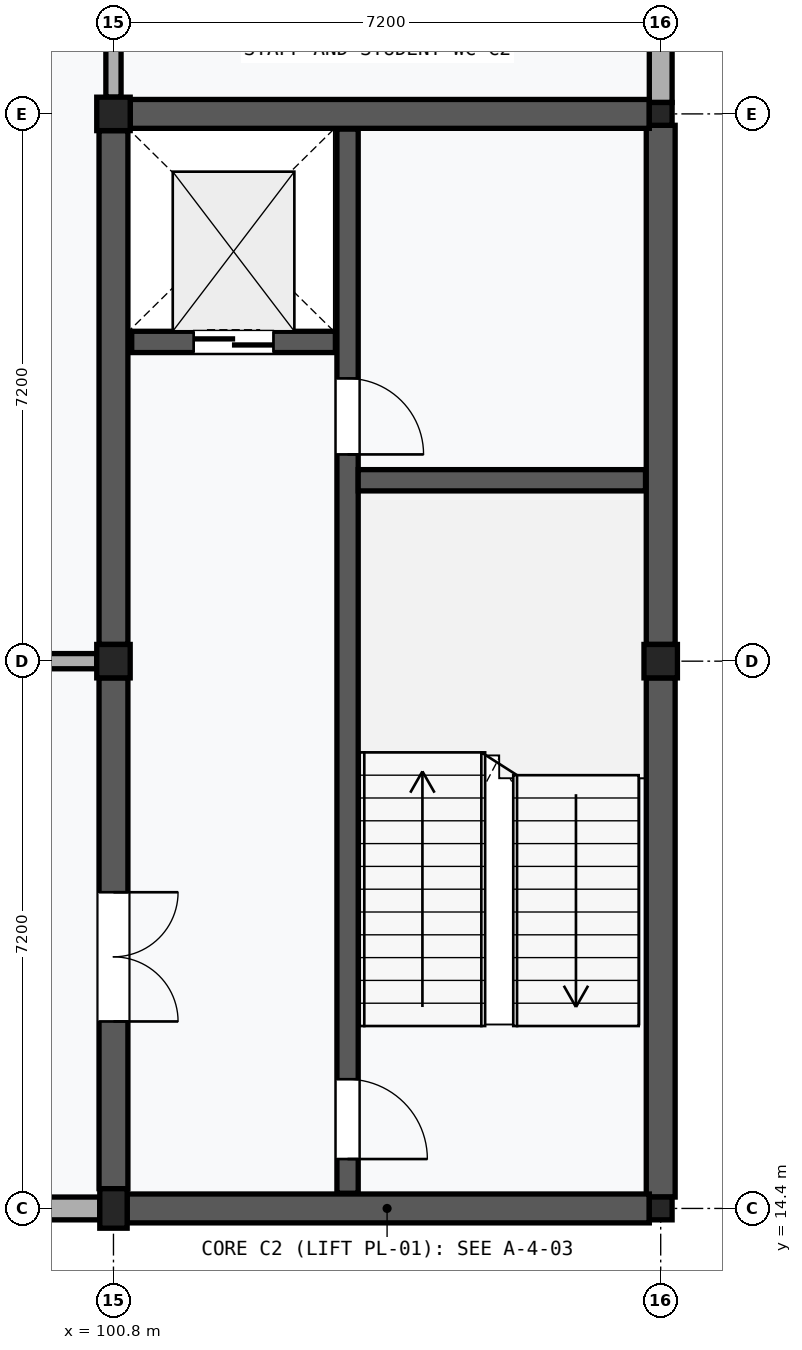
"""IFC4 building model, lengths in metres.
Left out: names, types, materials, properties, quantities, classifications, styles, units other than length and angle.
Written with IfcOpenShell. Run it as: python <this file> out.ifc"""

import sys

from ifc_helpers import new_model, si_unit, direction, frame, frame_2d, origin, origin_2d, place, context, subcontext, project, spatial, rectangle, extrude, element, fill, save


model = new_model("IFC4")
c1 = context("Model", 3, precision=1e-05, world=origin(), true_north=direction((0.0, 1.0)))
c2 = subcontext(c1, "Body", "Model", "MODEL_VIEW")
j1 = project(units=[si_unit("LENGTHUNIT", "METRE"), si_unit("PLANEANGLEUNIT", "RADIAN")], contexts=[c1])
p1 = place(None, origin())
s1 = spatial("IfcSite", under=j1, at=p1, CompositionType="ELEMENT")
p2 = place(p1, origin())
s2 = spatial("IfcBuilding", under=s1, at=p2, CompositionType="ELEMENT")
p3 = place(p2, frame((0.0, 0.0, 59.0)))
s3 = spatial("IfcBuildingStorey", under=s2, at=p3, CompositionType="ELEMENT", Elevation=59.0)
p4 = place(p3, frame((100.8, 14.4, 0.0), z_axis=(0.0, 0.0, 1.0), x_axis=(1.0, 0.0, 0.0)))
e1 = element("IfcColumn", 1, at=p4, inside=s3, PredefinedType="PILASTER", context=c2, shape_type="SweptSolid", body=[
    extrude(rectangle(XDim=0.36, YDim=0.52, at=origin_2d()), origin(), (0.0, 0.0, 1.0), 4.0),
])
for number, where, z_axis, x_axis in (
    (2, (100.8, 21.6, 0.0), (0.0, 0.0, 1.0), (1.0, 0.0, 0.0)),
    (3, (100.8, 28.8, 0.0), (0.0, 0.0, 1.0), (1.0, 0.0, 0.0)),
):
    element("IfcColumn", number, at=place(p3, frame(where, z_axis=z_axis, x_axis=x_axis)), inside=s3, PredefinedType="COLUMN", context=c2, shape_type="SweptSolid", body=[
        extrude(rectangle(XDim=0.44, YDim=0.44, at=origin_2d()), origin(), (0.0, 0.0, 1.0), 4.0),
    ])
p5 = place(p3, frame((108.0, 14.4, 0.0), z_axis=(0.0, 0.0, 1.0), x_axis=(1.0, 0.0, 0.0)))
e4 = element("IfcColumn", 4, at=p5, inside=s3, PredefinedType="COLUMN", context=c2, shape_type="SweptSolid", body=[
    extrude(rectangle(XDim=0.3, YDim=0.3, at=origin_2d()), origin(), (0.0, 0.0, 1.0), 4.0),
])
p6 = place(p3, frame((108.0, 21.6, 0.0), z_axis=(0.0, 0.0, 1.0), x_axis=(1.0, 0.0, 0.0)))
e5 = element("IfcColumn", 5, at=p6, inside=s3, PredefinedType="COLUMN", context=c2, shape_type="SweptSolid", body=[
    extrude(rectangle(XDim=0.44, YDim=0.44, at=origin_2d()), origin(), (0.0, 0.0, 1.0), 4.0),
])
p7 = place(p3, frame((108.0, 28.8, 0.0), z_axis=(0.0, 0.0, 1.0), x_axis=(1.0, 0.0, 0.0)))
e6 = element("IfcColumn", 6, at=p7, inside=s3, PredefinedType="COLUMN", context=c2, shape_type="SweptSolid", body=[
    extrude(rectangle(XDim=0.3, YDim=0.3, at=origin_2d()), origin(), (0.0, 0.0, 1.0), 4.0),
])
p8 = place(p3, frame((93.75, 14.4, 0.0), z_axis=(0.0, 0.0, 1.0), x_axis=(1.0, 0.0, 0.0)))
e7 = element("IfcWall", 7, at=p8, inside=s3, PredefinedType="SOLIDWALL", context=c2, shape_type="SweptSolid", body=[
    extrude(rectangle(XDim=6.87, YDim=0.3, at=frame_2d((3.435, 0.0))), origin(), (0.0, 0.0, 1.0), 3.19),
])
p9 = place(p8, frame((1.735, 0.0, 0.9)))
e8 = element("IfcOpeningElement", 8, at=p9, cuts=e7, PredefinedType="OPENING", context=c2, shape_type="SweptSolid", body=[
    extrude(rectangle(XDim=3.4, YDim=1.8, at=frame_2d((1.7, 0.9))), frame((0.0, 0.162, 0.0), z_axis=(0.0, -1.0, 0.0), x_axis=(1.0, 0.0, 0.0)), (0.0, 0.0, 1.0), 0.324),
])
p10 = place(p3, frame((108.0, 28.95, 0.0), z_axis=(0.0, 0.0, 1.0), x_axis=(0.0, 1.0, 0.0)))
e9 = element("IfcWall", 9, at=p10, inside=s3, PredefinedType="SOLIDWALL", context=c2, shape_type="SweptSolid", body=[
    extrude(rectangle(XDim=6.79, YDim=0.3, at=frame_2d((3.395, 0.0))), origin(), (0.0, 0.0, 1.0), 3.19),
])
p11 = place(p3, frame((100.8, 14.66, 0.0), z_axis=(0.0, 0.0, 1.0), x_axis=(0.0, 1.0, 0.0)))
e10 = element("IfcWall", 10, at=p11, inside=s3, PredefinedType="SHEAR", context=c2, shape_type="SweptSolid", body=[
    extrude(rectangle(XDim=6.72, YDim=0.38, at=frame_2d((3.36, 0.0))), origin(), (0.0, 0.0, 1.0), 3.11),
])
p12 = place(p11, frame((2.2, 0.0, 0.0)))
e11 = element("IfcOpeningElement", 11, at=p12, cuts=e10, PredefinedType="OPENING", context=c2, shape_type="SweptSolid", body=[
    extrude(rectangle(XDim=1.7, YDim=2.25, at=frame_2d((0.85, 1.125))), frame((0.0, 0.202, 0.0), z_axis=(0.0, -1.0, 0.0), x_axis=(1.0, 0.0, 0.0)), (0.0, 0.0, 1.0), 0.404),
])
p13 = place(p3, frame((100.8, 21.82, 0.0), z_axis=(0.0, 0.0, 1.0), x_axis=(0.0, 1.0, 0.0)))
e12 = element("IfcWall", 12, at=p13, inside=s3, PredefinedType="SHEAR", context=c2, shape_type="SweptSolid", body=[
    extrude(rectangle(XDim=6.76, YDim=0.38, at=frame_2d((3.38, 0.0))), origin(), (0.0, 0.0, 1.0), 3.11),
])
for number, where, z_axis, x_axis in (
    (13, (108.0, 14.55, 0.0), (0.0, 0.0, 1.0), (0.0, 1.0, 0.0)),
    (14, (108.0, 21.82, 0.0), (0.0, 0.0, 1.0), (0.0, 1.0, 0.0)),
):
    element("IfcWall", number, at=place(p3, frame(where, z_axis=z_axis, x_axis=x_axis)), inside=s3, PredefinedType="SHEAR", context=c2, shape_type="SweptSolid", body=[
        extrude(rectangle(XDim=6.83, YDim=0.38, at=frame_2d((3.415, 0.0))), origin(), (0.0, 0.0, 1.0), 3.19),
    ])
p14 = place(p3, frame((100.98, 14.4, 0.0), z_axis=(0.0, 0.0, 1.0), x_axis=(1.0, 0.0, 0.0)))
e15 = element("IfcWall", 15, at=p14, inside=s3, PredefinedType="SHEAR", context=c2, shape_type="SweptSolid", body=[
    extrude(rectangle(XDim=6.87, YDim=0.38, at=frame_2d((3.435, 0.0))), origin(), (0.0, 0.0, 1.0), 3.19),
])
p15 = place(p3, frame((101.02, 28.8, 0.0), z_axis=(0.0, 0.0, 1.0), x_axis=(1.0, 0.0, 0.0)))
e16 = element("IfcWall", 16, at=p15, inside=s3, PredefinedType="SHEAR", context=c2, shape_type="SweptSolid", body=[
    extrude(rectangle(XDim=6.83, YDim=0.38, at=frame_2d((3.415, 0.0))), origin(), (0.0, 0.0, 1.0), 3.11),
])
p16 = place(p3, frame((103.88, 14.6, 0.0), z_axis=(0.0, 0.0, 1.0), x_axis=(0.0, 1.0, 0.0)))
e17 = element("IfcWall", 17, at=p16, inside=s3, PredefinedType="SHEAR", context=c2, shape_type="SweptSolid", body=[
    extrude(rectangle(XDim=14.0, YDim=0.28, at=frame_2d((7.0, 0.0))), origin(), (0.0, 0.0, 1.0), 3.76),
])
p17 = place(p16, frame((0.45, 0.0, 0.0)))
e18 = element("IfcOpeningElement", 18, at=p17, cuts=e17, PredefinedType="OPENING", context=c2, shape_type="SweptSolid", body=[
    extrude(rectangle(XDim=1.05, YDim=2.15, at=frame_2d((0.525, 1.075))), frame((0.0, 0.152, 0.0), z_axis=(0.0, -1.0, 0.0), x_axis=(1.0, 0.0, 0.0)), (0.0, 0.0, 1.0), 0.304),
])
p18 = place(p16, frame((9.72, 0.0, 0.0)))
e19 = element("IfcOpeningElement", 19, at=p18, cuts=e17, PredefinedType="OPENING", context=c2, shape_type="SweptSolid", body=[
    extrude(rectangle(XDim=1.0, YDim=2.15, at=frame_2d((0.5, 1.075))), frame((0.0, 0.152, 0.0), z_axis=(0.0, -1.0, 0.0), x_axis=(1.0, 0.0, 0.0)), (0.0, 0.0, 1.0), 0.304),
])
p19 = place(p3, frame((104.02, 23.98, 0.0), z_axis=(0.0, 0.0, 1.0), x_axis=(1.0, 0.0, 0.0)))
e20 = element("IfcWall", 20, at=p19, inside=s3, PredefinedType="SHEAR", context=c2, shape_type="SweptSolid", body=[
    extrude(rectangle(XDim=3.78, YDim=0.28, at=frame_2d((1.89, 0.0))), origin(), (0.0, 0.0, 1.0), 3.76),
])
p20 = place(p3, frame((101.04, 25.8, 0.0), z_axis=(0.0, 0.0, 1.0), x_axis=(1.0, 0.0, 0.0)))
e21 = element("IfcWall", 21, at=p20, inside=s3, PredefinedType="SHEAR", context=c2, shape_type="SweptSolid", body=[
    extrude(rectangle(XDim=2.68, YDim=0.28, at=frame_2d((1.34, 0.0))), origin(), (0.0, 0.0, 1.0), 3.76),
])
p21 = place(p20, frame((0.815, 0.0, 0.0)))
e22 = element("IfcOpeningElement", 22, at=p21, cuts=e21, PredefinedType="OPENING", context=c2, shape_type="SweptSolid", body=[
    extrude(rectangle(XDim=1.05, YDim=2.2, at=frame_2d((0.525, 1.1))), frame((0.0, 0.152, 0.0), z_axis=(0.0, -1.0, 0.0), x_axis=(1.0, 0.0, 0.0)), (0.0, 0.0, 1.0), 0.304),
])
p22 = place(p3, frame((93.82, 21.6, 0.0), z_axis=(0.0, 0.0, 1.0), x_axis=(1.0, 0.0, 0.0)))
e23 = element("IfcWall", 23, at=p22, inside=s3, PredefinedType="PARTITIONING", context=c2, shape_type="SweptSolid", body=[
    extrude(rectangle(XDim=6.76, YDim=0.2, at=frame_2d((3.38, 0.0))), origin(), (0.0, 0.0, 1.0), 3.11),
])
p23 = place(p22, frame((2.76, 0.0, 0.0)))
e24 = element("IfcOpeningElement", 24, at=p23, cuts=e23, PredefinedType="OPENING", context=c2, shape_type="SweptSolid", body=[
    extrude(rectangle(XDim=1.24, YDim=2.26, at=frame_2d((0.62, 1.13))), frame((0.0, 0.112, 0.0), z_axis=(0.0, -1.0, 0.0), x_axis=(1.0, 0.0, 0.0)), (0.0, 0.0, 1.0), 0.224),
])
p24 = place(p3, frame((100.8, 29.02, 0.0), z_axis=(0.0, 0.0, 1.0), x_axis=(0.0, 1.0, 0.0)))
e25 = element("IfcWall", 25, at=p24, inside=s3, PredefinedType="PARTITIONING", context=c2, shape_type="SweptSolid", body=[
    extrude(rectangle(XDim=6.76, YDim=0.2, at=frame_2d((3.38, 0.0))), origin(), (0.0, 0.0, 1.0), 3.11),
])
p25 = place(p12, frame((1.7, 0.0, 0.0), z_axis=(0.0, 0.0, 1.0), x_axis=(-1.0, 0.0, 0.0)))
e26 = element("IfcDoor", 26, at=p25, inside=s3, OperationType="DOUBLE_DOOR_SINGLE_SWING", PredefinedType="DOOR", context=c2, shape_type="SweptSolid", body=[
    extrude(rectangle(XDim=1.7, YDim=2.25, at=frame_2d((0.85, 1.125))), frame((0.0, 0.025, 0.0), z_axis=(0.0, -1.0, 0.0), x_axis=(1.0, 0.0, 0.0)), (0.0, 0.0, 1.0), 0.05),
])
fill(e11, e26)
p26 = place(p17, frame((1.05, 0.0, 0.0), z_axis=(0.0, 0.0, 1.0), x_axis=(-1.0, 0.0, 0.0)))
e27 = element("IfcDoor", 27, at=p26, inside=s3, OperationType="SINGLE_SWING_RIGHT", PredefinedType="DOOR", context=c2, shape_type="SweptSolid", body=[
    extrude(rectangle(XDim=1.05, YDim=2.15, at=frame_2d((0.525, 1.075))), frame((0.0, 0.025, 0.0), z_axis=(0.0, -1.0, 0.0), x_axis=(1.0, 0.0, 0.0)), (0.0, 0.0, 1.0), 0.05),
])
fill(e18, e27)
p27 = place(p18, frame((1.0, 0.0, 0.0), z_axis=(0.0, 0.0, 1.0), x_axis=(-1.0, 0.0, 0.0)))
e28 = element("IfcDoor", 28, at=p27, inside=s3, OperationType="SINGLE_SWING_RIGHT", PredefinedType="DOOR", context=c2, shape_type="SweptSolid", body=[
    extrude(rectangle(XDim=1.0, YDim=2.15, at=frame_2d((0.5, 1.075))), frame((0.0, 0.025, 0.0), z_axis=(0.0, -1.0, 0.0), x_axis=(1.0, 0.0, 0.0)), (0.0, 0.0, 1.0), 0.05),
])
fill(e19, e28)
p28 = place(p21, frame((1.05, 0.0, 0.0), z_axis=(0.0, 0.0, 1.0), x_axis=(-1.0, 0.0, 0.0)))
e29 = element("IfcDoor", 29, at=p28, inside=s3, OperationType="DOUBLE_DOOR_SLIDING", PredefinedType="DOOR", context=c2, shape_type="SweptSolid", body=[
    extrude(rectangle(XDim=1.05, YDim=2.2, at=frame_2d((0.525, 1.1))), frame((0.0, 0.025, 0.0), z_axis=(0.0, -1.0, 0.0), x_axis=(1.0, 0.0, 0.0)), (0.0, 0.0, 1.0), 0.05),
])
fill(e22, e29)
save(model, sys.argv[1])
